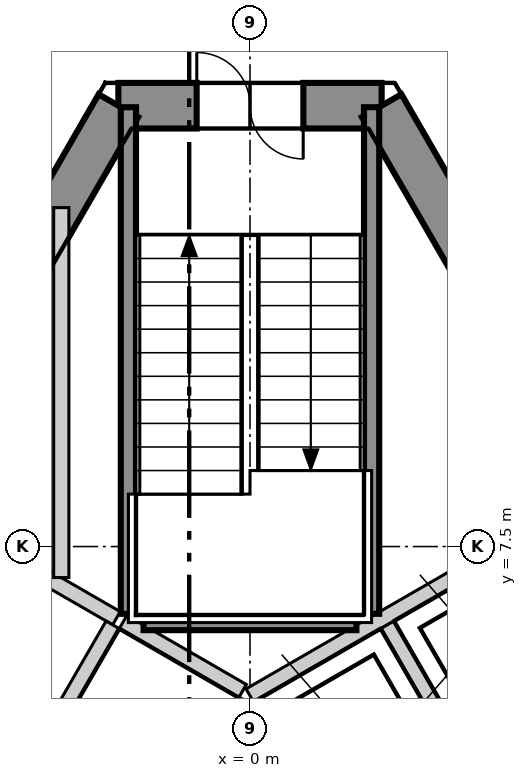
"""IFC4 building model, lengths in metres.
Left out: names, types, materials, properties, quantities, classifications, styles, units other than length and angle.
Written with IfcOpenShell. Run it as: python <this file> out.ifc"""

import sys

from ifc_helpers import new_model, si_unit, direction, frame, frame_2d, origin, place, context, subcontext, project, spatial, polyline, rectangle, outline, extrude, element, fill, save


model = new_model("IFC4")
c1 = context("Model", 3, precision=1e-05, world=origin(), true_north=direction((0.0, 1.0)))
c2 = subcontext(c1, "Body", "Model", "MODEL_VIEW")
j1 = project(units=[si_unit("LENGTHUNIT", "METRE"), si_unit("PLANEANGLEUNIT", "RADIAN")], contexts=[c1])
p1 = place(None, origin())
s1 = spatial("IfcSite", under=j1, at=p1, CompositionType="ELEMENT")
p2 = place(p1, origin())
s2 = spatial("IfcBuilding", under=s1, at=p2, CompositionType="ELEMENT")
p3 = place(p2, frame((0.0, 0.0, 289.9)))
s3 = spatial("IfcBuildingStorey", under=s2, at=p3, CompositionType="ELEMENT", Elevation=289.9)
p4 = place(p3, frame((1.732, 13.3, -0.3), z_axis=(0.0, 0.0, 1.0), x_axis=(-1.0, 0.0, 0.0)))
e1 = element("IfcWall", 1, at=p4, inside=s3, PredefinedType="SHEAR", context=c2, shape_type="SweptSolid", body=[
    extrude(outline(polyline([(-0.173, -0.3), (1.732, -0.3), (3.637, -0.3), (3.291, 0.3), (1.732, 0.3), (0.173, 0.3), (-0.173, -0.3)])), origin(), (0.0, 0.0, 1.0), 3.6),
])
p5 = place(p4, frame((1.032, 0.0, 0.3)))
e2 = element("IfcOpeningElement", 2, at=p5, cuts=e1, PredefinedType="OPENING", context=c2, shape_type="SweptSolid", body=[
    extrude(rectangle(XDim=1.4, YDim=2.1, at=frame_2d((0.7, 1.05))), frame((0.0, 0.31, 0.0), z_axis=(0.0, -1.0, 0.0), x_axis=(1.0, 0.0, 0.0)), (0.0, 0.0, 1.0), 0.62),
])
p6 = place(p3, frame((-1.732, 13.3, -0.3), z_axis=(0.0, 0.0, 1.0), x_axis=(-0.500000539815, -0.866025092122, 0.0)))
e3 = element("IfcWall", 3, at=p6, inside=s3, PredefinedType="SHEAR", context=c2, shape_type="SweptSolid", body=[
    extrude(outline(polyline([(-0.173, -0.3), (1.795, -0.3), (3.763, -0.3), (5.732, -0.3), (7.7, -0.3), (9.668, -0.301), (11.637, -0.301), (13.605, -0.301), (15.573, -0.301), (17.542, -0.301), (19.51, -0.301), (21.478, -0.301), (21.131, 0.3), (19.226, 0.3), (17.321, 0.3), (15.415, 0.3), (13.51, 0.3), (11.605, 0.3), (9.699, 0.3), (7.794, 0.3), (5.889, 0.3), (3.984, 0.3), (2.078, 0.3), (0.173, 0.3), (-0.173, -0.3)])), origin(), (0.0, 0.0, 1.0), 3.6),
])
p7 = place(p6, frame((10.102, 0.0, 0.3)))
e4 = element("IfcOpeningElement", 4, at=p7, cuts=e3, PredefinedType="OPENING", context=c2, shape_type="SweptSolid", body=[
    extrude(rectangle(XDim=1.1, YDim=2.1, at=frame_2d((0.55, 1.05))), frame((0.0, 0.31, 0.0), z_axis=(0.0, -1.0, 0.0), x_axis=(1.0, 0.0, 0.0)), (0.0, 0.0, 1.0), 0.621),
])
p8 = place(p6, frame((16.328, 0.0, 0.3)))
e5 = element("IfcOpeningElement", 5, at=p8, cuts=e3, PredefinedType="OPENING", context=c2, shape_type="SweptSolid", body=[
    extrude(rectangle(XDim=1.0, YDim=2.1, at=frame_2d((0.5, 1.05))), frame((0.0, 0.31, 0.0), z_axis=(0.0, -1.0, 0.0), x_axis=(1.0, 0.0, 0.0)), (0.0, 0.0, 1.0), 0.621),
])
p9 = place(p6, frame((4.777, 0.0, 0.3)))
e6 = element("IfcOpeningElement", 6, at=p9, cuts=e3, PredefinedType="OPENING", context=c2, shape_type="SweptSolid", body=[
    extrude(rectangle(XDim=0.9, YDim=2.1, at=frame_2d((0.45, 1.05))), frame((0.0, 0.31, 0.0), z_axis=(0.0, -1.0, 0.0), x_axis=(1.0, 0.0, 0.0)), (0.0, 0.0, 1.0), 0.621),
])
p10 = place(p3, frame((12.384, -5.15, -0.3), z_axis=(0.0, 0.0, 1.0), x_axis=(-0.500000539815, 0.866025092122, 0.0)))
e7 = element("IfcWall", 7, at=p10, inside=s3, PredefinedType="SHEAR", context=c2, shape_type="SweptSolid", body=[
    extrude(outline(polyline([(-0.173, -0.301), (1.795, -0.301), (3.763, -0.301), (5.731, -0.301), (7.7, -0.301), (9.668, -0.301), (11.636, -0.301), (13.604, -0.3), (15.573, -0.3), (17.541, -0.3), (19.509, -0.3), (21.477, -0.3), (21.131, 0.3), (19.226, 0.3), (17.321, 0.3), (15.415, 0.3), (13.51, 0.3), (11.605, 0.3), (9.699, 0.3), (7.794, 0.3), (5.889, 0.3), (3.984, 0.3), (2.078, 0.3), (0.173, 0.3), (-0.173, -0.301)])), origin(), (0.0, 0.0, 1.0), 3.6),
])
p11 = place(p10, frame((16.378, 0.0, 0.3)))
e8 = element("IfcOpeningElement", 8, at=p11, cuts=e7, PredefinedType="OPENING", context=c2, shape_type="SweptSolid", body=[
    extrude(rectangle(XDim=0.9, YDim=2.1, at=frame_2d((0.45, 1.05))), frame((0.0, 0.31, 0.0), z_axis=(0.0, -1.0, 0.0), x_axis=(1.0, 0.0, 0.0)), (0.0, 0.0, 1.0), 0.621),
])
p12 = place(p10, frame((4.026, 0.0, 0.3)))
e9 = element("IfcOpeningElement", 9, at=p12, cuts=e7, PredefinedType="OPENING", context=c2, shape_type="SweptSolid", body=[
    extrude(rectangle(XDim=0.9, YDim=2.1, at=frame_2d((0.45, 1.05))), frame((0.0, 0.31, 0.0), z_axis=(0.0, -1.0, 0.0), x_axis=(1.0, 0.0, 0.0)), (0.0, 0.0, 1.0), 0.621),
])
p13 = place(p3, frame((-2.494, 27.86, 0.0), z_axis=(0.0, 0.0, 1.0), x_axis=(-0.500008134474, -0.866020707292, 0.0)))
e10 = element("IfcWall", 10, at=p13, inside=s3, PredefinedType="ELEMENTEDWALL", context=c2, shape_type="SweptSolid", body=[
    extrude(rectangle(XDim=45.741, YDim=0.2, at=frame_2d((22.871, 0.0))), origin(), (0.0, 0.0, 1.0), 3.3),
])
p14 = place(p13, frame((2.15, 0.0, 0.9)))
e11 = element("IfcOpeningElement", 11, at=p14, cuts=e10, PredefinedType="OPENING", context=c2, shape_type="SweptSolid", body=[
    extrude(rectangle(XDim=3.7, YDim=2.2, at=frame_2d((1.85, 1.1))), frame((0.0, 0.11, 0.0), z_axis=(0.0, -1.0, 0.0), x_axis=(1.0, 0.0, 0.0)), (0.0, 0.0, 1.0), 0.22),
])
p15 = place(p13, frame((7.544, 0.0, 0.9)))
e12 = element("IfcOpeningElement", 12, at=p15, cuts=e10, PredefinedType="OPENING", context=c2, shape_type="SweptSolid", body=[
    extrude(rectangle(XDim=3.7, YDim=2.2, at=frame_2d((1.85, 1.1))), frame((0.0, 0.11, 0.0), z_axis=(0.0, -1.0, 0.0), x_axis=(1.0, 0.0, 0.0)), (0.0, 0.0, 1.0), 0.22),
])
p16 = place(p13, frame((12.939, 0.0, 0.9)))
e13 = element("IfcOpeningElement", 13, at=p16, cuts=e10, PredefinedType="OPENING", context=c2, shape_type="SweptSolid", body=[
    extrude(rectangle(XDim=3.7, YDim=2.2, at=frame_2d((1.85, 1.1))), frame((0.0, 0.11, 0.0), z_axis=(0.0, -1.0, 0.0), x_axis=(1.0, 0.0, 0.0)), (0.0, 0.0, 1.0), 0.22),
])
p17 = place(p13, frame((18.333, 0.0, 0.9)))
e14 = element("IfcOpeningElement", 14, at=p17, cuts=e10, PredefinedType="OPENING", context=c2, shape_type="SweptSolid", body=[
    extrude(rectangle(XDim=3.7, YDim=2.2, at=frame_2d((1.85, 1.1))), frame((0.0, 0.11, 0.0), z_axis=(0.0, -1.0, 0.0), x_axis=(1.0, 0.0, 0.0)), (0.0, 0.0, 1.0), 0.22),
])
p18 = place(p13, frame((23.728, 0.0, 0.9)))
e15 = element("IfcOpeningElement", 15, at=p18, cuts=e10, PredefinedType="OPENING", context=c2, shape_type="SweptSolid", body=[
    extrude(rectangle(XDim=3.7, YDim=2.2, at=frame_2d((1.85, 1.1))), frame((0.0, 0.11, 0.0), z_axis=(0.0, -1.0, 0.0), x_axis=(1.0, 0.0, 0.0)), (0.0, 0.0, 1.0), 0.22),
])
p19 = place(p13, frame((29.122, 0.0, 0.9)))
e16 = element("IfcOpeningElement", 16, at=p19, cuts=e10, PredefinedType="OPENING", context=c2, shape_type="SweptSolid", body=[
    extrude(rectangle(XDim=3.7, YDim=2.2, at=frame_2d((1.85, 1.1))), frame((0.0, 0.11, 0.0), z_axis=(0.0, -1.0, 0.0), x_axis=(1.0, 0.0, 0.0)), (0.0, 0.0, 1.0), 0.22),
])
p20 = place(p13, frame((34.517, 0.0, 0.9)))
e17 = element("IfcOpeningElement", 17, at=p20, cuts=e10, PredefinedType="OPENING", context=c2, shape_type="SweptSolid", body=[
    extrude(rectangle(XDim=3.7, YDim=2.2, at=frame_2d((1.85, 1.1))), frame((0.0, 0.11, 0.0), z_axis=(0.0, -1.0, 0.0), x_axis=(1.0, 0.0, 0.0)), (0.0, 0.0, 1.0), 0.22),
])
p21 = place(p13, frame((39.911, 0.0, 0.9)))
e18 = element("IfcOpeningElement", 18, at=p21, cuts=e10, PredefinedType="OPENING", context=c2, shape_type="SweptSolid", body=[
    extrude(rectangle(XDim=3.7, YDim=2.2, at=frame_2d((1.85, 1.1))), frame((0.0, 0.11, 0.0), z_axis=(0.0, -1.0, 0.0), x_axis=(1.0, 0.0, 0.0)), (0.0, 0.0, 1.0), 0.22),
])
p22 = place(p3, frame((25.375, -11.77, 0.0), z_axis=(0.0, 0.0, 1.0), x_axis=(-0.500008134474, 0.866020707292, 0.0)))
e19 = element("IfcWall", 19, at=p22, inside=s3, PredefinedType="ELEMENTEDWALL", context=c2, shape_type="SweptSolid", body=[
    extrude(rectangle(XDim=45.741, YDim=0.2, at=frame_2d((22.871, 0.0))), origin(), (0.0, 0.0, 1.0), 3.3),
])
p23 = place(p22, frame((2.15, 0.0, 0.9)))
e20 = element("IfcOpeningElement", 20, at=p23, cuts=e19, PredefinedType="OPENING", context=c2, shape_type="SweptSolid", body=[
    extrude(rectangle(XDim=3.7, YDim=2.2, at=frame_2d((1.85, 1.1))), frame((0.0, 0.11, 0.0), z_axis=(0.0, -1.0, 0.0), x_axis=(1.0, 0.0, 0.0)), (0.0, 0.0, 1.0), 0.22),
])
p24 = place(p22, frame((7.544, 0.0, 0.9)))
e21 = element("IfcOpeningElement", 21, at=p24, cuts=e19, PredefinedType="OPENING", context=c2, shape_type="SweptSolid", body=[
    extrude(rectangle(XDim=3.7, YDim=2.2, at=frame_2d((1.85, 1.1))), frame((0.0, 0.11, 0.0), z_axis=(0.0, -1.0, 0.0), x_axis=(1.0, 0.0, 0.0)), (0.0, 0.0, 1.0), 0.22),
])
p25 = place(p22, frame((12.939, 0.0, 0.9)))
e22 = element("IfcOpeningElement", 22, at=p25, cuts=e19, PredefinedType="OPENING", context=c2, shape_type="SweptSolid", body=[
    extrude(rectangle(XDim=3.7, YDim=2.2, at=frame_2d((1.85, 1.1))), frame((0.0, 0.11, 0.0), z_axis=(0.0, -1.0, 0.0), x_axis=(1.0, 0.0, 0.0)), (0.0, 0.0, 1.0), 0.22),
])
p26 = place(p22, frame((18.333, 0.0, 0.9)))
e23 = element("IfcOpeningElement", 23, at=p26, cuts=e19, PredefinedType="OPENING", context=c2, shape_type="SweptSolid", body=[
    extrude(rectangle(XDim=3.7, YDim=2.2, at=frame_2d((1.85, 1.1))), frame((0.0, 0.11, 0.0), z_axis=(0.0, -1.0, 0.0), x_axis=(1.0, 0.0, 0.0)), (0.0, 0.0, 1.0), 0.22),
])
p27 = place(p22, frame((23.728, 0.0, 0.9)))
e24 = element("IfcOpeningElement", 24, at=p27, cuts=e19, PredefinedType="OPENING", context=c2, shape_type="SweptSolid", body=[
    extrude(rectangle(XDim=3.7, YDim=2.2, at=frame_2d((1.85, 1.1))), frame((0.0, 0.11, 0.0), z_axis=(0.0, -1.0, 0.0), x_axis=(1.0, 0.0, 0.0)), (0.0, 0.0, 1.0), 0.22),
])
p28 = place(p22, frame((29.122, 0.0, 0.9)))
e25 = element("IfcOpeningElement", 25, at=p28, cuts=e19, PredefinedType="OPENING", context=c2, shape_type="SweptSolid", body=[
    extrude(rectangle(XDim=3.7, YDim=2.2, at=frame_2d((1.85, 1.1))), frame((0.0, 0.11, 0.0), z_axis=(0.0, -1.0, 0.0), x_axis=(1.0, 0.0, 0.0)), (0.0, 0.0, 1.0), 0.22),
])
p29 = place(p22, frame((34.517, 0.0, 0.9)))
e26 = element("IfcOpeningElement", 26, at=p29, cuts=e19, PredefinedType="OPENING", context=c2, shape_type="SweptSolid", body=[
    extrude(rectangle(XDim=3.7, YDim=2.2, at=frame_2d((1.85, 1.1))), frame((0.0, 0.11, 0.0), z_axis=(0.0, -1.0, 0.0), x_axis=(1.0, 0.0, 0.0)), (0.0, 0.0, 1.0), 0.22),
])
p30 = place(p22, frame((39.911, 0.0, 0.9)))
e27 = element("IfcOpeningElement", 27, at=p30, cuts=e19, PredefinedType="OPENING", context=c2, shape_type="SweptSolid", body=[
    extrude(rectangle(XDim=3.7, YDim=2.2, at=frame_2d((1.85, 1.1))), frame((0.0, 0.11, 0.0), z_axis=(0.0, -1.0, 0.0), x_axis=(1.0, 0.0, 0.0)), (0.0, 0.0, 1.0), 0.22),
])
p31 = place(p3, frame((-17.679, -10.12, 0.0), z_axis=(0.0, 0.0, 1.0), x_axis=(0.500008955215, 0.866020233427, 0.0)))
e28 = element("IfcWall", 28, at=p31, inside=s3, PredefinedType="PARTITIONING", context=c2, shape_type="SweptSolid", body=[
    extrude(rectangle(XDim=35.357, YDim=0.15, at=frame_2d((17.679, 0.0))), origin(), (0.0, 0.0, 1.0), 3.3),
])
p32 = place(p31, frame((31.407, 0.0, 0.0)))
e29 = element("IfcOpeningElement", 29, at=p32, cuts=e28, PredefinedType="OPENING", context=c2, shape_type="SweptSolid", body=[
    extrude(rectangle(XDim=1.0, YDim=2.1, at=frame_2d((0.5, 1.05))), frame((0.0, 0.085, 0.0), z_axis=(0.0, -1.0, 0.0), x_axis=(1.0, 0.0, 0.0)), (0.0, 0.0, 1.0), 0.17),
])
p33 = place(p31, frame((25.642, 0.0, 0.0)))
e30 = element("IfcOpeningElement", 30, at=p33, cuts=e28, PredefinedType="OPENING", context=c2, shape_type="SweptSolid", body=[
    extrude(rectangle(XDim=1.0, YDim=2.1, at=frame_2d((0.5, 1.05))), frame((0.0, 0.085, 0.0), z_axis=(0.0, -1.0, 0.0), x_axis=(1.0, 0.0, 0.0)), (0.0, 0.0, 1.0), 0.17),
])
p34 = place(p31, frame((18.348, 0.0, 0.0)))
e31 = element("IfcOpeningElement", 31, at=p34, cuts=e28, PredefinedType="OPENING", context=c2, shape_type="SweptSolid", body=[
    extrude(rectangle(XDim=1.0, YDim=2.1, at=frame_2d((0.5, 1.05))), frame((0.0, 0.085, 0.0), z_axis=(0.0, -1.0, 0.0), x_axis=(1.0, 0.0, 0.0)), (0.0, 0.0, 1.0), 0.17),
])
p35 = place(p31, frame((13.254, 0.0, 0.0)))
e32 = element("IfcOpeningElement", 32, at=p35, cuts=e28, PredefinedType="OPENING", context=c2, shape_type="SweptSolid", body=[
    extrude(rectangle(XDim=1.0, YDim=2.1, at=frame_2d((0.5, 1.05))), frame((0.0, 0.085, 0.0), z_axis=(0.0, -1.0, 0.0), x_axis=(1.0, 0.0, 0.0)), (0.0, 0.0, 1.0), 0.17),
])
p36 = place(p31, frame((7.559, 0.0, 0.0)))
e33 = element("IfcOpeningElement", 33, at=p36, cuts=e28, PredefinedType="OPENING", context=c2, shape_type="SweptSolid", body=[
    extrude(rectangle(XDim=1.0, YDim=2.1, at=frame_2d((0.5, 1.05))), frame((0.0, 0.085, 0.0), z_axis=(0.0, -1.0, 0.0), x_axis=(1.0, 0.0, 0.0)), (0.0, 0.0, 1.0), 0.17),
])
p37 = place(p31, frame((2.865, 0.0, 0.0)))
e34 = element("IfcOpeningElement", 34, at=p37, cuts=e28, PredefinedType="OPENING", context=c2, shape_type="SweptSolid", body=[
    extrude(rectangle(XDim=1.0, YDim=2.1, at=frame_2d((0.5, 1.05))), frame((0.0, 0.085, 0.0), z_axis=(0.0, -1.0, 0.0), x_axis=(1.0, 0.0, 0.0)), (0.0, 0.0, 1.0), 0.17),
])
p38 = place(p3, frame((0.075, 20.37, 0.0), z_axis=(0.0, 0.0, 1.0), x_axis=(0.500009775255, -0.866019759965, 0.0)))
e35 = element("IfcWall", 35, at=p38, inside=s3, PredefinedType="PARTITIONING", context=c2, shape_type="SweptSolid", body=[
    extrude(rectangle(XDim=35.207, YDim=0.15, at=frame_2d((17.604, 0.0))), origin(), (0.0, 0.0, 1.0), 3.3),
])
p39 = place(p38, frame((31.407, 0.0, 0.0)))
e36 = element("IfcOpeningElement", 36, at=p39, cuts=e35, PredefinedType="OPENING", context=c2, shape_type="SweptSolid", body=[
    extrude(rectangle(XDim=1.0, YDim=2.1, at=frame_2d((0.5, 1.05))), frame((0.0, 0.085, 0.0), z_axis=(0.0, -1.0, 0.0), x_axis=(1.0, 0.0, 0.0)), (0.0, 0.0, 1.0), 0.17),
])
p40 = place(p38, frame((19.243, 0.0, 0.0)))
e37 = element("IfcOpeningElement", 37, at=p40, cuts=e35, PredefinedType="OPENING", context=c2, shape_type="SweptSolid", body=[
    extrude(rectangle(XDim=1.0, YDim=2.1, at=frame_2d((0.5, 1.05))), frame((0.0, 0.085, 0.0), z_axis=(0.0, -1.0, 0.0), x_axis=(1.0, 0.0, 0.0)), (0.0, 0.0, 1.0), 0.17),
])
p41 = place(p38, frame((24.543, 0.0, 0.0)))
e38 = element("IfcOpeningElement", 38, at=p41, cuts=e35, PredefinedType="OPENING", context=c2, shape_type="SweptSolid", body=[
    extrude(rectangle(XDim=0.9, YDim=2.1, at=frame_2d((0.45, 1.05))), frame((0.0, 0.085, 0.0), z_axis=(0.0, -1.0, 0.0), x_axis=(1.0, 0.0, 0.0)), (0.0, 0.0, 1.0), 0.17),
])
p42 = place(p38, frame((22.443, 0.0, 0.0)))
e39 = element("IfcOpeningElement", 39, at=p42, cuts=e35, PredefinedType="OPENING", context=c2, shape_type="SweptSolid", body=[
    extrude(rectangle(XDim=0.9, YDim=2.1, at=frame_2d((0.45, 1.05))), frame((0.0, 0.085, 0.0), z_axis=(0.0, -1.0, 0.0), x_axis=(1.0, 0.0, 0.0)), (0.0, 0.0, 1.0), 0.17),
])
p43 = place(p38, frame((13.253, 0.0, 0.0)))
e40 = element("IfcOpeningElement", 40, at=p43, cuts=e35, PredefinedType="OPENING", context=c2, shape_type="SweptSolid", body=[
    extrude(rectangle(XDim=1.0, YDim=2.1, at=frame_2d((0.5, 1.05))), frame((0.0, 0.085, 0.0), z_axis=(0.0, -1.0, 0.0), x_axis=(1.0, 0.0, 0.0)), (0.0, 0.0, 1.0), 0.17),
])
p44 = place(p38, frame((5.559, 0.0, 0.0)))
e41 = element("IfcOpeningElement", 41, at=p44, cuts=e35, PredefinedType="OPENING", context=c2, shape_type="SweptSolid", body=[
    extrude(rectangle(XDim=1.0, YDim=2.1, at=frame_2d((0.5, 1.05))), frame((0.0, 0.085, 0.0), z_axis=(0.0, -1.0, 0.0), x_axis=(1.0, 0.0, 0.0)), (0.0, 0.0, 1.0), 0.17),
])
p45 = place(p3, frame((-0.002, 5.541, 0.0), z_axis=(0.0, 0.0, 1.0), x_axis=(0.86600155993, 0.500041296494, 0.0)))
e42 = element("IfcWall", 42, at=p45, inside=s3, PredefinedType="SOLIDWALL", context=c2, shape_type="SweptSolid", body=[
    extrude(rectangle(XDim=4.132, YDim=0.2, at=frame_2d((2.066, 0.0))), origin(), (0.0, 0.0, 1.0), 3.3),
])
p46 = place(p3, frame((1.578, 2.874, 0.0), z_axis=(0.0, 0.0, 1.0), x_axis=(0.866045911672, 0.499964477614, 0.0)))
e43 = element("IfcWall", 43, at=p46, inside=s3, PredefinedType="SOLIDWALL", context=c2, shape_type="SweptSolid", body=[
    extrude(rectangle(XDim=5.327, YDim=0.2, at=frame_2d((2.663, 0.0))), origin(), (0.0, 0.0, 1.0), 3.3),
])
p47 = place(p46, frame((2.496, 0.0, 0.0)))
e44 = element("IfcOpeningElement", 44, at=p47, cuts=e43, PredefinedType="OPENING", context=c2, shape_type="SweptSolid", body=[
    extrude(rectangle(XDim=1.1, YDim=2.1, at=frame_2d((0.55, 1.05))), frame((0.0, 0.11, 0.0), z_axis=(0.0, -1.0, 0.0), x_axis=(1.0, 0.0, 0.0)), (0.0, 0.0, 1.0), 0.22),
])
p48 = place(p3, frame((1.807, 6.47, 0.0), z_axis=(0.0, 0.0, 1.0), x_axis=(0.50012328804, -0.865954211699, 0.0)))
e45 = element("IfcWall", 45, at=p48, inside=s3, PredefinedType="SOLIDWALL", context=c2, shape_type="SweptSolid", body=[
    extrude(rectangle(XDim=2.9, YDim=0.2, at=frame_2d((1.45, 0.0))), origin(), (0.0, 0.0, 1.0), 3.3),
])
p49 = place(p3, frame((-3.489, 7.557, 0.0), z_axis=(0.0, 0.0, 1.0), x_axis=(0.866010750942, -0.50002537861, 0.0)))
e46 = element("IfcWall", 46, at=p49, inside=s3, PredefinedType="SOLIDWALL", context=c2, shape_type="SweptSolid", body=[
    extrude(rectangle(XDim=2.0, YDim=0.2, at=frame_2d((1.0, 0.0))), origin(), (0.0, 0.0, 1.0), 3.3),
])
p50 = place(p3, frame((-3.257, 3.959, 0.0), z_axis=(0.0, 0.0, 1.0), x_axis=(0.50012328804, 0.865954211699, 0.0)))
e47 = element("IfcWall", 47, at=p50, inside=s3, PredefinedType="SOLIDWALL", context=c2, shape_type="SweptSolid", body=[
    extrude(rectangle(XDim=2.9, YDim=0.2, at=frame_2d((1.45, 0.0))), origin(), (0.0, 0.0, 1.0), 3.3),
])
p51 = place(p3, frame((-1.67, 6.507, 0.0), z_axis=(0.0, 0.0, 1.0), x_axis=(0.865941441609, -0.500145398563, 0.0)))
e48 = element("IfcWall", 48, at=p51, inside=s3, PredefinedType="SOLIDWALL", context=c2, shape_type="SweptSolid", body=[
    extrude(rectangle(XDim=1.815, YDim=0.2, at=frame_2d((0.908, 0.0))), origin(), (0.0, 0.0, 1.0), 3.3),
])
p52 = place(p3, frame((-2.483, 7.092, 0.0), z_axis=(0.0, 0.0, 1.0), x_axis=(0.0, 1.0, 0.0)))
e49 = element("IfcWall", 49, at=p52, inside=s3, PredefinedType="SOLIDWALL", context=c2, shape_type="SweptSolid", body=[
    extrude(rectangle(XDim=4.867, YDim=0.2, at=frame_2d((2.434, 0.0))), origin(), (0.0, 0.0, 1.0), 3.3),
])
p53 = place(p3, frame((1.6, 6.615, 0.0), z_axis=(0.0, 0.0, 1.0), x_axis=(0.0, 1.0, 0.0)))
e50 = element("IfcWall", 50, at=p53, inside=s3, PredefinedType="SOLIDWALL", context=c2, shape_type="SweptSolid", body=[
    extrude(rectangle(XDim=6.665, YDim=0.2, at=frame_2d((3.333, 0.0))), origin(), (0.0, 0.0, 1.0), 3.3),
])
p54 = place(p3, frame((-1.4, 6.5, 0.0), z_axis=(0.0, 0.0, 1.0), x_axis=(1.0, 0.0, 0.0)))
e51 = element("IfcWall", 51, at=p54, inside=s3, PredefinedType="SOLIDWALL", context=c2, shape_type="SweptSolid", body=[
    extrude(rectangle(XDim=2.8, YDim=0.2, at=frame_2d((1.4, 0.0))), origin(), (0.0, 0.0, 1.0), 3.3),
])
p55 = place(p3, frame((-1.6, 6.615, 0.0), z_axis=(0.0, 0.0, 1.0), x_axis=(0.0, 1.0, 0.0)))
e52 = element("IfcWall", 52, at=p55, inside=s3, PredefinedType="SOLIDWALL", context=c2, shape_type="SweptSolid", body=[
    extrude(rectangle(XDim=6.665, YDim=0.2, at=frame_2d((3.333, 0.0))), origin(), (0.0, 0.0, 1.0), 3.3),
])
p56 = place(p5, origin())
e53 = element("IfcDoor", 53, at=p56, inside=s3, OperationType="DOUBLE_DOOR_SINGLE_SWING", PredefinedType="DOOR", context=c2, shape_type="SweptSolid", body=[
    extrude(rectangle(XDim=1.4, YDim=2.1, at=frame_2d((0.7, 1.05))), frame((0.0, 0.025, 0.0), z_axis=(0.0, -1.0, 0.0), x_axis=(1.0, 0.0, 0.0)), (0.0, 0.0, 1.0), 0.05),
])
fill(e2, e53)
save(model, sys.argv[1])
